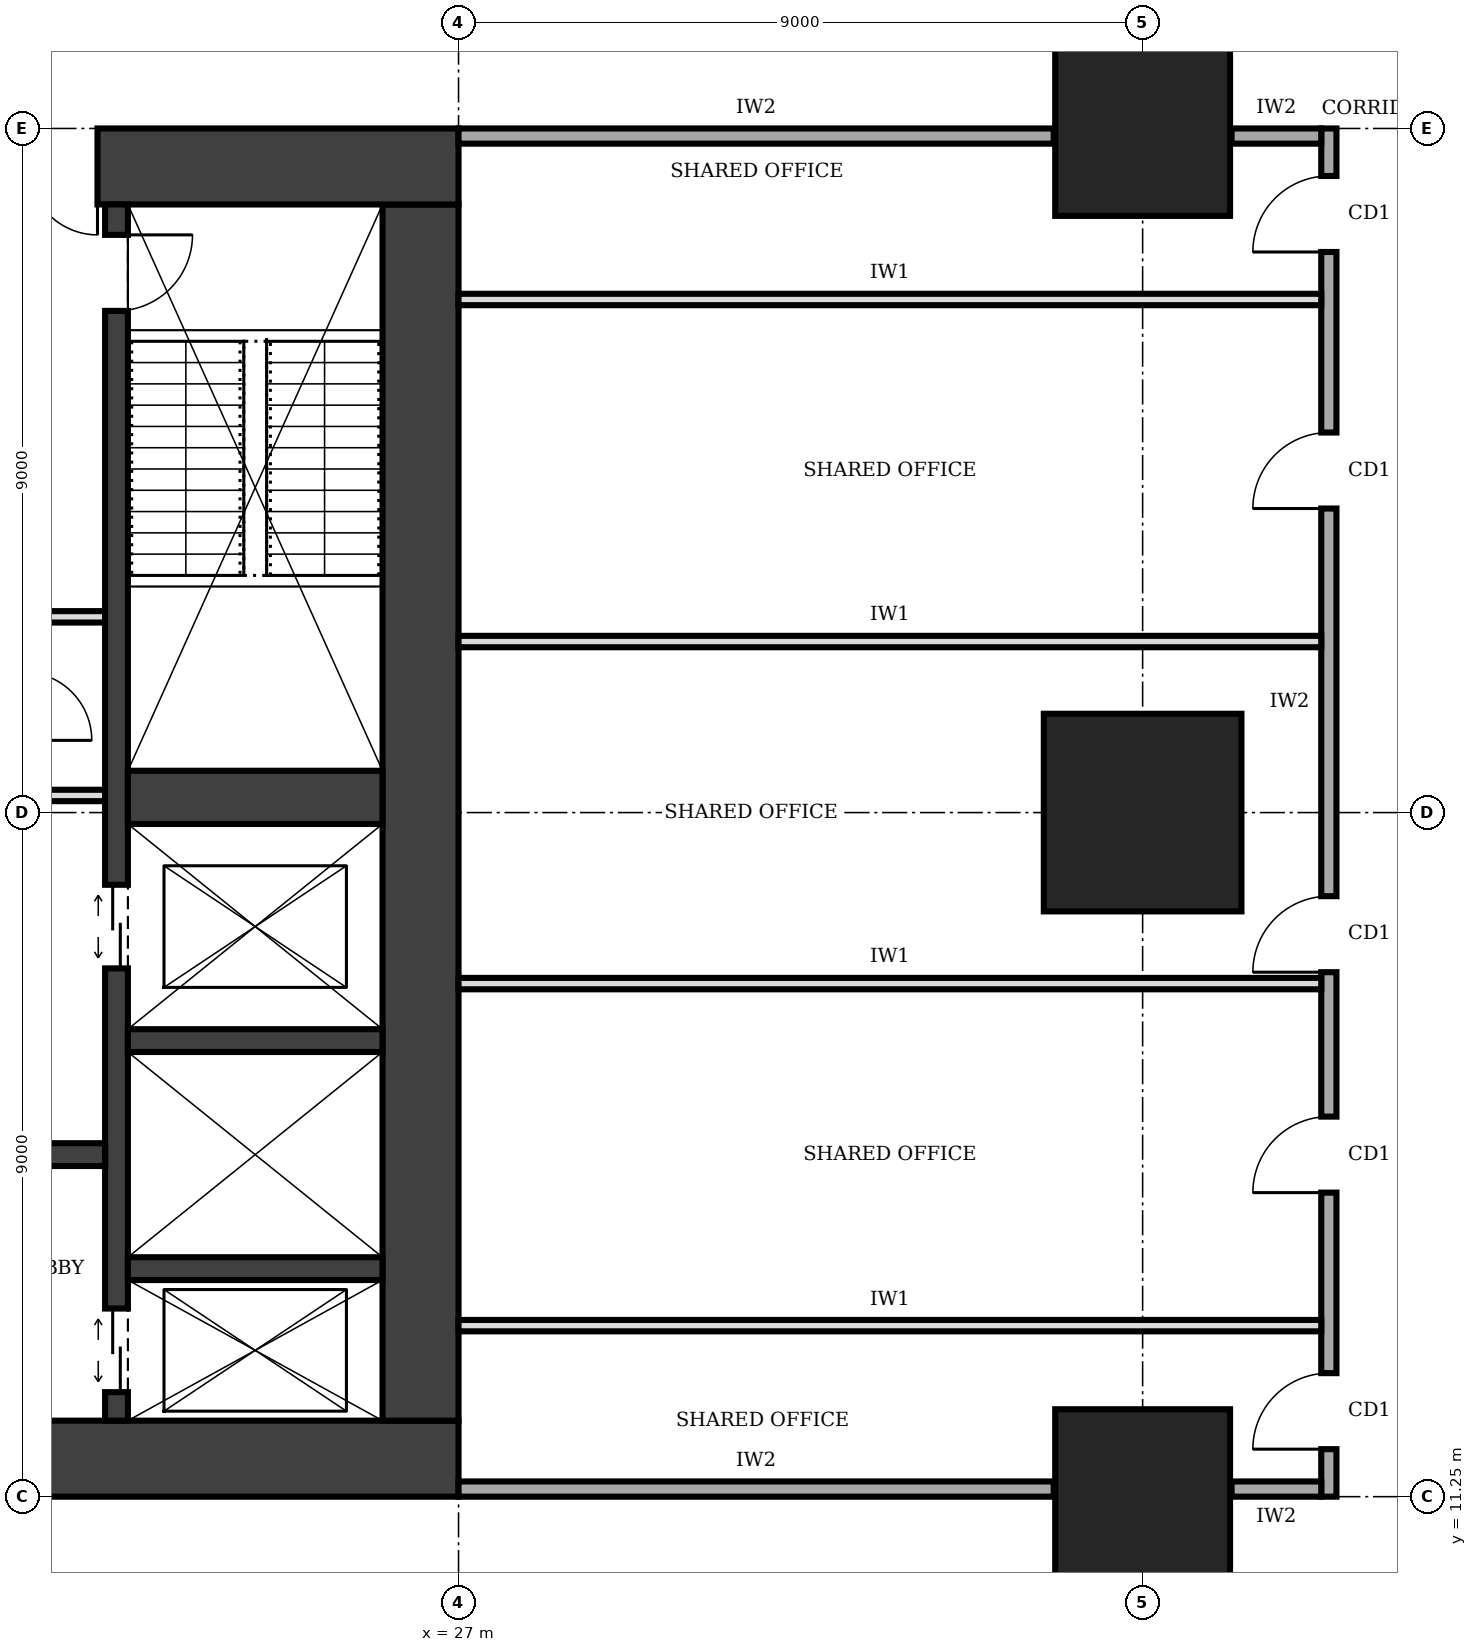
"""IFC4 building model, lengths in metres.
Left out: names, types, materials, properties, quantities, classifications, styles, units other than length and angle.
Written with IfcOpenShell. Run it as: python <this file> out.ifc"""

import sys

from ifc_helpers import new_model, si_unit, direction, frame, frame_2d, origin, origin_2d, place, context, subcontext, project, spatial, rectangle, extrude, element, fill, save


model = new_model("IFC4")
c1 = context("Model", 3, precision=1e-05, world=origin(), true_north=direction((0.0, 1.0)))
c2 = subcontext(c1, "Body", "Model", "MODEL_VIEW")
j1 = project(units=[si_unit("LENGTHUNIT", "METRE"), si_unit("PLANEANGLEUNIT", "RADIAN")], contexts=[c1])
p1 = place(None, origin())
s1 = spatial("IfcSite", under=j1, at=p1, CompositionType="ELEMENT")
p2 = place(p1, origin())
s2 = spatial("IfcBuilding", under=s1, at=p2, CompositionType="ELEMENT")
p3 = place(p2, frame((0.0, 0.0, 93.0)))
s3 = spatial("IfcBuildingStorey", under=s2, at=p3, CompositionType="ELEMENT", Elevation=93.0)
p4 = place(p3, frame((13.5, 11.75, 0.0), z_axis=(0.0, 0.0, 1.0), x_axis=(1.0, 0.0, 0.0)))
e1 = element("IfcWall", 1, at=p4, inside=s3, PredefinedType="SHEAR", context=c2, shape_type="SweptSolid", body=[
    extrude(rectangle(XDim=13.5, YDim=1.0, at=frame_2d((6.75, 0.0))), origin(), (0.0, 0.0, 1.0), 4.0),
])
p5 = place(p4, frame((4.75, 0.0, 0.0)))
e2 = element("IfcOpeningElement", 2, at=p5, cuts=e1, PredefinedType="OPENING", context=c2, shape_type="SweptSolid", body=[
    extrude(rectangle(XDim=1.0, YDim=2.1, at=frame_2d((0.5, 1.05))), frame((0.0, 0.51, 0.0), z_axis=(0.0, -1.0, 0.0), x_axis=(1.0, 0.0, 0.0)), (0.0, 0.0, 1.0), 1.02),
])
p6 = place(p3, frame((26.5, 12.25, 0.0), z_axis=(0.0, 0.0, 1.0), x_axis=(0.0, 1.0, 0.0)))
e3 = element("IfcWall", 3, at=p6, inside=s3, PredefinedType="SHEAR", context=c2, shape_type="SweptSolid", body=[
    extrude(rectangle(XDim=16.0, YDim=1.0, at=frame_2d((8.0, 0.0))), origin(), (0.0, 0.0, 1.0), 4.0),
])
p7 = place(p3, frame((27.0, 28.75, 0.0), z_axis=(0.0, 0.0, 1.0), x_axis=(-1.0, 0.0, 0.0)))
e4 = element("IfcWall", 4, at=p7, inside=s3, PredefinedType="SHEAR", context=c2, shape_type="SweptSolid", body=[
    extrude(rectangle(XDim=13.5, YDim=1.0, at=frame_2d((6.75, 0.0))), origin(), (0.0, 0.0, 1.0), 4.0),
])
p8 = place(p7, frame((4.75, 0.0, 0.0)))
e5 = element("IfcOpeningElement", 5, at=p8, cuts=e4, PredefinedType="OPENING", context=c2, shape_type="SweptSolid", body=[
    extrude(rectangle(XDim=1.8, YDim=2.1, at=frame_2d((0.9, 1.05))), frame((0.0, 0.51, 0.0), z_axis=(0.0, -1.0, 0.0), x_axis=(1.0, 0.0, 0.0)), (0.0, 0.0, 1.0), 1.02),
])
p9 = place(p3, frame((22.5, 12.25, 0.0), z_axis=(0.0, 0.0, 1.0), x_axis=(0.0, 1.0, 0.0)))
e6 = element("IfcWall", 6, at=p9, inside=s3, PredefinedType="SHEAR", context=c2, shape_type="SweptSolid", body=[
    extrude(rectangle(XDim=16.0, YDim=0.3, at=frame_2d((8.0, 0.0))), origin(), (0.0, 0.0, 1.0), 4.0),
])
p10 = place(p9, frame((14.6, 0.0, 0.0)))
e7 = element("IfcOpeningElement", 7, at=p10, cuts=e6, PredefinedType="OPENING", context=c2, shape_type="SweptSolid", body=[
    extrude(rectangle(XDim=1.0, YDim=2.1, at=frame_2d((0.5, 1.05))), frame((0.0, 0.16, 0.0), z_axis=(0.0, -1.0, 0.0), x_axis=(1.0, 0.0, 0.0)), (0.0, 0.0, 1.0), 0.32),
])
p11 = place(p9, frame((0.375, 0.0, 0.0)))
e8 = element("IfcOpeningElement", 8, at=p11, cuts=e6, PredefinedType="OPENING", context=c2, shape_type="SweptSolid", body=[
    extrude(rectangle(XDim=1.1, YDim=2.1, at=frame_2d((0.55, 1.05))), frame((0.0, 0.16, 0.0), z_axis=(0.0, -1.0, 0.0), x_axis=(1.0, 0.0, 0.0)), (0.0, 0.0, 1.0), 0.32),
])
p12 = place(p9, frame((5.95, 0.0, 0.0)))
e9 = element("IfcOpeningElement", 9, at=p12, cuts=e6, PredefinedType="OPENING", context=c2, shape_type="SweptSolid", body=[
    extrude(rectangle(XDim=1.1, YDim=2.1, at=frame_2d((0.55, 1.05))), frame((0.0, 0.16, 0.0), z_axis=(0.0, -1.0, 0.0), x_axis=(1.0, 0.0, 0.0)), (0.0, 0.0, 1.0), 0.32),
])
p13 = place(p3, frame((18.15, 15.75, 0.0), z_axis=(0.0, 0.0, 1.0), x_axis=(1.0, 0.0, 0.0)))
e10 = element("IfcWall", 10, at=p13, inside=s3, PredefinedType="SHEAR", context=c2, shape_type="SweptSolid", body=[
    extrude(rectangle(XDim=4.2, YDim=0.3, at=frame_2d((2.1, 0.0))), origin(), (0.0, 0.0, 1.0), 4.0),
])
p14 = place(p13, frame((1.6, 0.0, 0.0)))
e11 = element("IfcOpeningElement", 11, at=p14, cuts=e10, PredefinedType="OPENING", context=c2, shape_type="SweptSolid", body=[
    extrude(rectangle(XDim=1.0, YDim=2.1, at=frame_2d((0.5, 1.05))), frame((0.0, 0.16, 0.0), z_axis=(0.0, -1.0, 0.0), x_axis=(1.0, 0.0, 0.0)), (0.0, 0.0, 1.0), 0.32),
])
for number, where, z_axis, x_axis in (
    (12, (22.65, 14.25, 0.0), (0.0, 0.0, 1.0), (1.0, 0.0, 0.0)),
    (13, (22.65, 17.25, 0.0), (0.0, 0.0, 1.0), (1.0, 0.0, 0.0)),
):
    element("IfcWall", number, at=place(p3, frame(where, z_axis=z_axis, x_axis=x_axis)), inside=s3, PredefinedType="SHEAR", context=c2, shape_type="SweptSolid", body=[
        extrude(rectangle(XDim=3.35, YDim=0.3, at=frame_2d((1.675, 0.0))), origin(), (0.0, 0.0, 1.0), 4.0),
    ])
p15 = place(p3, frame((22.65, 20.45, 0.0), z_axis=(0.0, 0.0, 1.0), x_axis=(1.0, 0.0, 0.0)))
e14 = element("IfcWall", 14, at=p15, inside=s3, PredefinedType="SHEAR", context=c2, shape_type="SweptSolid", body=[
    extrude(rectangle(XDim=3.35, YDim=0.7, at=frame_2d((1.675, 0.0))), origin(), (0.0, 0.0, 1.0), 4.0),
])
p16 = place(p3, frame((36.0, 11.25, 0.0), z_axis=(0.0, 0.0, 1.0), x_axis=(1.0, 0.0, 0.0)))
e15 = element("IfcColumn", 15, at=p16, inside=s3, PredefinedType="COLUMN", context=c2, shape_type="SweptSolid", body=[
    extrude(rectangle(XDim=2.3, YDim=2.3, at=origin_2d()), origin(), (0.0, 0.0, 1.0), 4.0),
])
p17 = place(p3, frame((36.0, 20.25, 0.0), z_axis=(0.0, 0.0, 1.0), x_axis=(1.0, 0.0, 0.0)))
e16 = element("IfcColumn", 16, at=p17, inside=s3, PredefinedType="COLUMN", context=c2, shape_type="SweptSolid", body=[
    extrude(rectangle(XDim=2.6, YDim=2.6, at=origin_2d()), origin(), (0.0, 0.0, 1.0), 4.0),
])
p18 = place(p3, frame((36.0, 29.25, 0.0), z_axis=(0.0, 0.0, 1.0), x_axis=(1.0, 0.0, 0.0)))
e17 = element("IfcColumn", 17, at=p18, inside=s3, PredefinedType="COLUMN", context=c2, shape_type="SweptSolid", body=[
    extrude(rectangle(XDim=2.3, YDim=2.3, at=origin_2d()), origin(), (0.0, 0.0, 1.0), 4.0),
])
for number, where, z_axis, x_axis in (
    (18, (21.35, 20.475, 0.0), (0.0, 0.0, 1.0), (1.0, 0.0, 0.0)),
    (19, (21.35, 22.825, 0.0), (0.0, 0.0, 1.0), (1.0, 0.0, 0.0)),
):
    element("IfcWall", number, at=place(p3, frame(where, z_axis=z_axis, x_axis=x_axis)), inside=s3, PredefinedType="PARTITIONING", context=c2, shape_type="SweptSolid", body=[
        extrude(rectangle(XDim=1.0, YDim=0.15, at=frame_2d((0.5, 0.0))), origin(), (0.0, 0.0, 1.0), 3.75),
    ])
p19 = place(p3, frame((38.45, 11.25, 0.0), z_axis=(0.0, 0.0, 1.0), x_axis=(0.0, 1.0, 0.0)))
e20 = element("IfcWall", 20, at=p19, inside=s3, PredefinedType="SOLIDWALL", context=c2, shape_type="SweptSolid", body=[
    extrude(rectangle(XDim=18.0, YDim=0.2, at=frame_2d((9.0, 0.0))), origin(), (0.0, 0.0, 1.0), 3.75),
])
p20 = place(p19, frame((0.625, 0.0, 0.0)))
e21 = element("IfcOpeningElement", 21, at=p20, cuts=e20, PredefinedType="OPENING", context=c2, shape_type="SweptSolid", body=[
    extrude(rectangle(XDim=1.0, YDim=2.1, at=frame_2d((0.5, 1.05))), frame((0.0, 0.11, 0.0), z_axis=(0.0, -1.0, 0.0), x_axis=(1.0, 0.0, 0.0)), (0.0, 0.0, 1.0), 0.22),
])
p21 = place(p19, frame((4.0, 0.0, 0.0)))
e22 = element("IfcOpeningElement", 22, at=p21, cuts=e20, PredefinedType="OPENING", context=c2, shape_type="SweptSolid", body=[
    extrude(rectangle(XDim=1.0, YDim=2.1, at=frame_2d((0.5, 1.05))), frame((0.0, 0.11, 0.0), z_axis=(0.0, -1.0, 0.0), x_axis=(1.0, 0.0, 0.0)), (0.0, 0.0, 1.0), 0.22),
])
p22 = place(p19, frame((6.9, 0.0, 0.0)))
e23 = element("IfcOpeningElement", 23, at=p22, cuts=e20, PredefinedType="OPENING", context=c2, shape_type="SweptSolid", body=[
    extrude(rectangle(XDim=1.0, YDim=2.1, at=frame_2d((0.5, 1.05))), frame((0.0, 0.11, 0.0), z_axis=(0.0, -1.0, 0.0), x_axis=(1.0, 0.0, 0.0)), (0.0, 0.0, 1.0), 0.22),
])
p23 = place(p19, frame((13.0, 0.0, 0.0)))
e24 = element("IfcOpeningElement", 24, at=p23, cuts=e20, PredefinedType="OPENING", context=c2, shape_type="SweptSolid", body=[
    extrude(rectangle(XDim=1.0, YDim=2.1, at=frame_2d((0.5, 1.05))), frame((0.0, 0.11, 0.0), z_axis=(0.0, -1.0, 0.0), x_axis=(1.0, 0.0, 0.0)), (0.0, 0.0, 1.0), 0.22),
])
p24 = place(p19, frame((16.375, 0.0, 0.0)))
e25 = element("IfcOpeningElement", 25, at=p24, cuts=e20, PredefinedType="OPENING", context=c2, shape_type="SweptSolid", body=[
    extrude(rectangle(XDim=1.0, YDim=2.1, at=frame_2d((0.5, 1.05))), frame((0.0, 0.11, 0.0), z_axis=(0.0, -1.0, 0.0), x_axis=(1.0, 0.0, 0.0)), (0.0, 0.0, 1.0), 0.22),
])
p25 = place(p3, frame((27.0, 11.35, 0.0), z_axis=(0.0, 0.0, 1.0), x_axis=(1.0, 0.0, 0.0)))
e26 = element("IfcWall", 26, at=p25, inside=s3, PredefinedType="SOLIDWALL", context=c2, shape_type="SweptSolid", body=[
    extrude(rectangle(XDim=7.83, YDim=0.2, at=frame_2d((3.915, 0.0))), origin(), (0.0, 0.0, 1.0), 2.85),
])
p26 = place(p3, frame((37.17, 11.35, 0.0), z_axis=(0.0, 0.0, 1.0), x_axis=(1.0, 0.0, 0.0)))
e27 = element("IfcWall", 27, at=p26, inside=s3, PredefinedType="SOLIDWALL", context=c2, shape_type="SweptSolid", body=[
    extrude(rectangle(XDim=1.18, YDim=0.2, at=frame_2d((0.59, 0.0))), origin(), (0.0, 0.0, 1.0), 2.85),
])
p27 = place(p3, frame((27.0, 29.15, 0.0), z_axis=(0.0, 0.0, 1.0), x_axis=(1.0, 0.0, 0.0)))
e28 = element("IfcWall", 28, at=p27, inside=s3, PredefinedType="SOLIDWALL", context=c2, shape_type="SweptSolid", body=[
    extrude(rectangle(XDim=7.83, YDim=0.2, at=frame_2d((3.915, 0.0))), origin(), (0.0, 0.0, 1.0), 2.85),
])
p28 = place(p3, frame((37.17, 29.15, 0.0), z_axis=(0.0, 0.0, 1.0), x_axis=(1.0, 0.0, 0.0)))
e29 = element("IfcWall", 29, at=p28, inside=s3, PredefinedType="SOLIDWALL", context=c2, shape_type="SweptSolid", body=[
    extrude(rectangle(XDim=1.18, YDim=0.2, at=frame_2d((0.59, 0.0))), origin(), (0.0, 0.0, 1.0), 2.85),
])
for number, where, z_axis, x_axis in (
    (30, (27.0, 13.5, 0.0), (0.0, 0.0, 1.0), (1.0, 0.0, 0.0)),
    (31, (27.0, 18.0, 0.0), (0.0, 0.0, 1.0), (1.0, 0.0, 0.0)),
    (32, (27.0, 22.5, 0.0), (0.0, 0.0, 1.0), (1.0, 0.0, 0.0)),
    (33, (27.0, 27.0, 0.0), (0.0, 0.0, 1.0), (1.0, 0.0, 0.0)),
):
    element("IfcWall", number, at=place(p3, frame(where, z_axis=z_axis, x_axis=x_axis)), inside=s3, PredefinedType="PARTITIONING", context=c2, shape_type="SweptSolid", body=[
        extrude(rectangle(XDim=11.35, YDim=0.15, at=frame_2d((5.675, 0.0))), origin(), (0.0, 0.0, 1.0), 3.75),
    ])
p29 = place(p8, origin())
e34 = element("IfcDoor", 34, at=p29, inside=s3, OperationType="DOUBLE_DOOR_SINGLE_SWING", PredefinedType="DOOR", context=c2, shape_type="SweptSolid", body=[
    extrude(rectangle(XDim=1.8, YDim=2.1, at=frame_2d((0.9, 1.05))), frame((0.0, 0.025, 0.0), z_axis=(0.0, -1.0, 0.0), x_axis=(1.0, 0.0, 0.0)), (0.0, 0.0, 1.0), 0.05),
])
fill(e5, e34)
p30 = place(p10, frame((1.0, 0.0, 0.0), z_axis=(0.0, 0.0, 1.0), x_axis=(-1.0, 0.0, 0.0)))
e35 = element("IfcDoor", 35, at=p30, inside=s3, OperationType="SINGLE_SWING_LEFT", PredefinedType="DOOR", context=c2, shape_type="SweptSolid", body=[
    extrude(rectangle(XDim=1.0, YDim=2.1, at=frame_2d((0.5, 1.05))), frame((0.0, 0.025, 0.0), z_axis=(0.0, -1.0, 0.0), x_axis=(1.0, 0.0, 0.0)), (0.0, 0.0, 1.0), 0.05),
])
fill(e7, e35)
p31 = place(p11, origin())
e36 = element("IfcDoor", 36, at=p31, inside=s3, OperationType="DOUBLE_DOOR_SLIDING", PredefinedType="DOOR", context=c2, shape_type="SweptSolid", body=[
    extrude(rectangle(XDim=1.1, YDim=2.1, at=frame_2d((0.55, 1.05))), frame((0.0, 0.025, 0.0), z_axis=(0.0, -1.0, 0.0), x_axis=(1.0, 0.0, 0.0)), (0.0, 0.0, 1.0), 0.05),
])
fill(e8, e36)
p32 = place(p12, origin())
e37 = element("IfcDoor", 37, at=p32, inside=s3, OperationType="DOUBLE_DOOR_SLIDING", PredefinedType="DOOR", context=c2, shape_type="SweptSolid", body=[
    extrude(rectangle(XDim=1.1, YDim=2.1, at=frame_2d((0.55, 1.05))), frame((0.0, 0.025, 0.0), z_axis=(0.0, -1.0, 0.0), x_axis=(1.0, 0.0, 0.0)), (0.0, 0.0, 1.0), 0.05),
])
fill(e9, e37)
p33 = place(p20, origin())
e38 = element("IfcDoor", 38, at=p33, inside=s3, OperationType="SINGLE_SWING_LEFT", PredefinedType="DOOR", context=c2, shape_type="SweptSolid", body=[
    extrude(rectangle(XDim=1.0, YDim=2.1, at=frame_2d((0.5, 1.05))), frame((0.0, 0.025, 0.0), z_axis=(0.0, -1.0, 0.0), x_axis=(1.0, 0.0, 0.0)), (0.0, 0.0, 1.0), 0.05),
])
fill(e21, e38)
p34 = place(p21, origin())
e39 = element("IfcDoor", 39, at=p34, inside=s3, OperationType="SINGLE_SWING_LEFT", PredefinedType="DOOR", context=c2, shape_type="SweptSolid", body=[
    extrude(rectangle(XDim=1.0, YDim=2.1, at=frame_2d((0.5, 1.05))), frame((0.0, 0.025, 0.0), z_axis=(0.0, -1.0, 0.0), x_axis=(1.0, 0.0, 0.0)), (0.0, 0.0, 1.0), 0.05),
])
fill(e22, e39)
p35 = place(p22, origin())
e40 = element("IfcDoor", 40, at=p35, inside=s3, OperationType="SINGLE_SWING_LEFT", PredefinedType="DOOR", context=c2, shape_type="SweptSolid", body=[
    extrude(rectangle(XDim=1.0, YDim=2.1, at=frame_2d((0.5, 1.05))), frame((0.0, 0.025, 0.0), z_axis=(0.0, -1.0, 0.0), x_axis=(1.0, 0.0, 0.0)), (0.0, 0.0, 1.0), 0.05),
])
fill(e23, e40)
p36 = place(p23, origin())
e41 = element("IfcDoor", 41, at=p36, inside=s3, OperationType="SINGLE_SWING_LEFT", PredefinedType="DOOR", context=c2, shape_type="SweptSolid", body=[
    extrude(rectangle(XDim=1.0, YDim=2.1, at=frame_2d((0.5, 1.05))), frame((0.0, 0.025, 0.0), z_axis=(0.0, -1.0, 0.0), x_axis=(1.0, 0.0, 0.0)), (0.0, 0.0, 1.0), 0.05),
])
fill(e24, e41)
p37 = place(p24, origin())
e42 = element("IfcDoor", 42, at=p37, inside=s3, OperationType="SINGLE_SWING_LEFT", PredefinedType="DOOR", context=c2, shape_type="SweptSolid", body=[
    extrude(rectangle(XDim=1.0, YDim=2.1, at=frame_2d((0.5, 1.05))), frame((0.0, 0.025, 0.0), z_axis=(0.0, -1.0, 0.0), x_axis=(1.0, 0.0, 0.0)), (0.0, 0.0, 1.0), 0.05),
])
fill(e25, e42)
save(model, sys.argv[1])
